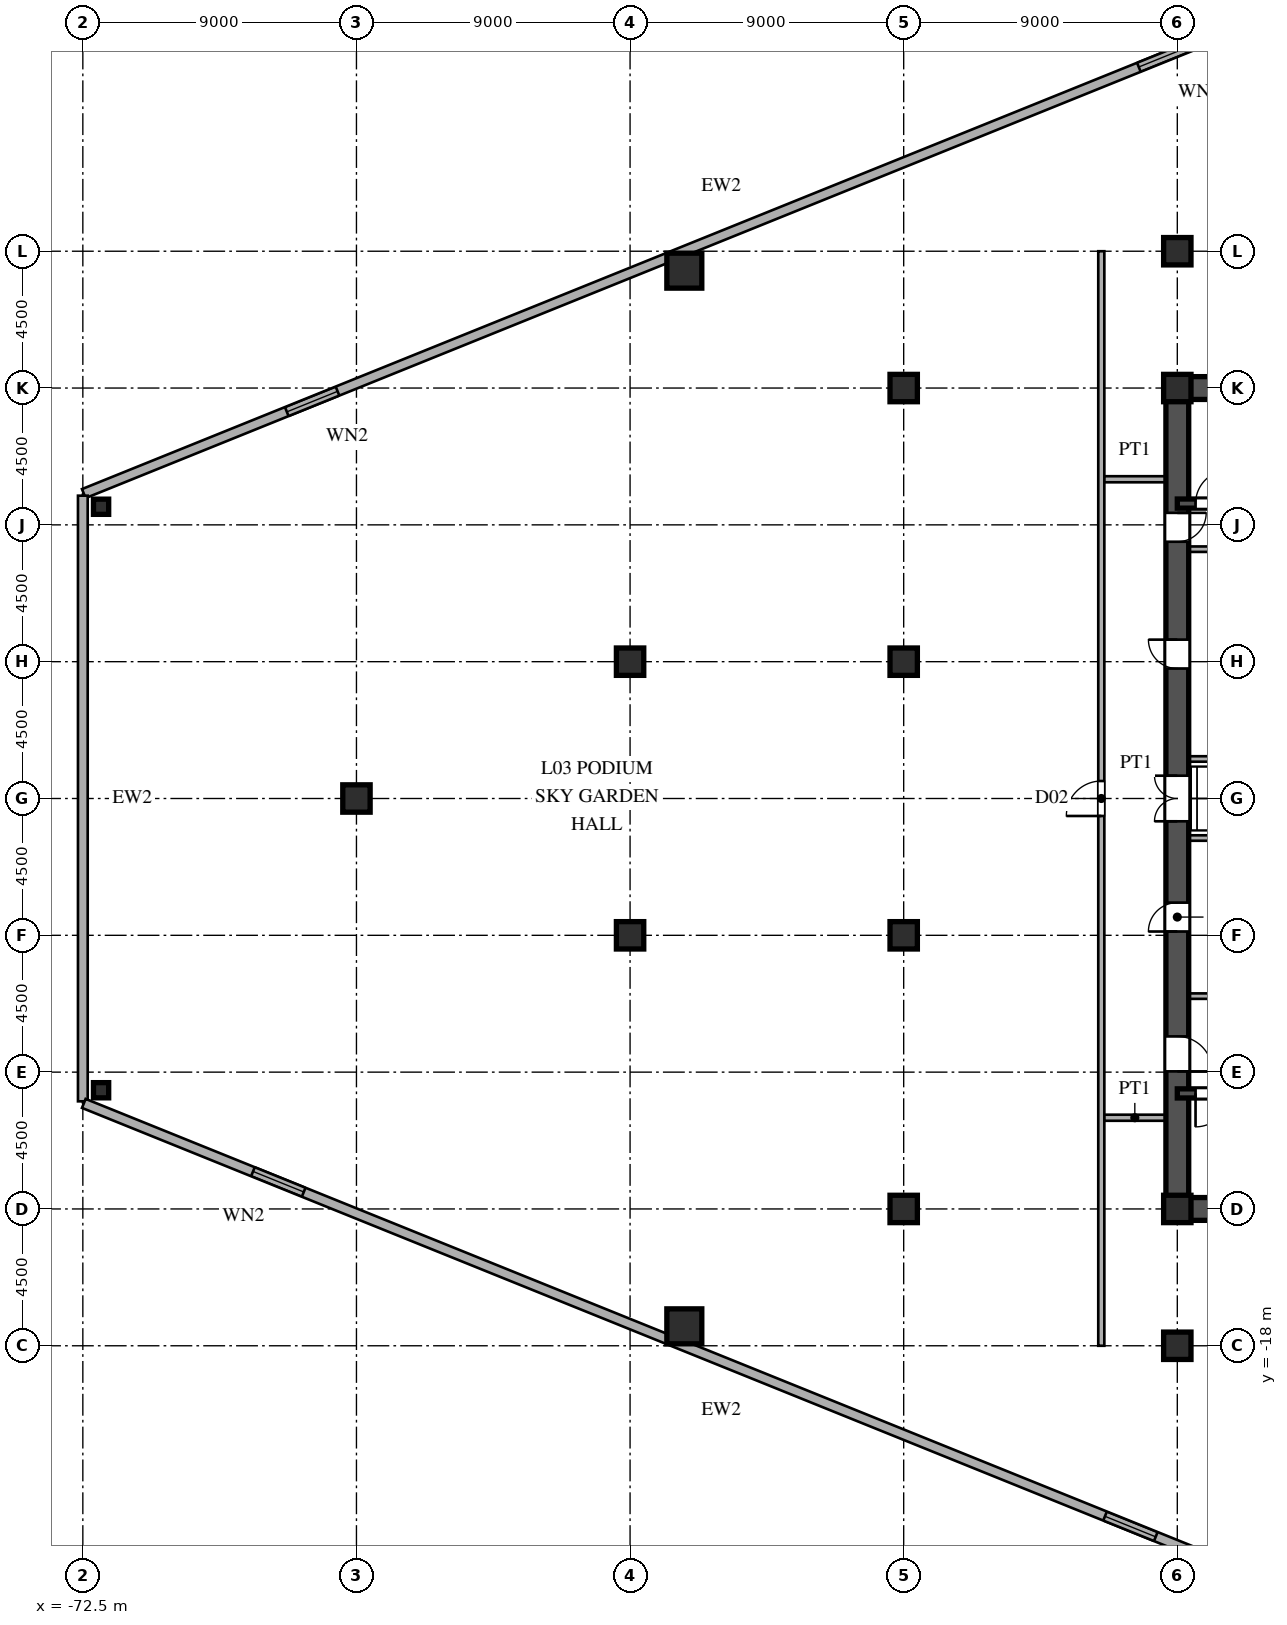
"""IFC4 building model, lengths in metres.
Left out: names, types, materials, properties, quantities, classifications, styles, units other than length and angle.
Written with IfcOpenShell. Run it as: python <this file> out.ifc"""

import sys

from ifc_helpers import new_model, si_unit, direction, frame, frame_2d, origin, origin_2d, place, context, subcontext, project, spatial, rectangle, hollow_rectangle, i_section, extrude, source, transform, mapped, element, fill, save


model = new_model("IFC4")
c1 = context("Model", 3, precision=1e-05, world=origin(), true_north=direction((0.0, 1.0)))
c2 = subcontext(c1, "Body", "Model", "MODEL_VIEW")
j1 = project(units=[si_unit("LENGTHUNIT", "METRE"), si_unit("PLANEANGLEUNIT", "RADIAN")], contexts=[c1])
p1 = place(None, origin())
s1 = spatial("IfcSite", under=j1, at=p1, CompositionType="ELEMENT")
p2 = place(p1, origin())
s2 = spatial("IfcBuilding", under=s1, at=p2, CompositionType="ELEMENT")
p3 = place(p2, frame((0.0, 0.0, 14.4)))
s3 = spatial("IfcBuildingStorey", under=s2, at=p3, CompositionType="ELEMENT", Elevation=14.4)
m1 = source(origin(), c2, "Body", "SweptSolid", [
    extrude(i_section(OverallWidth=0.9, OverallDepth=0.9, WebThickness=0.036, FlangeThickness=0.055, at=origin_2d()), origin(), (0.0, 0.0, 1.0), 4.5),
])
for number, where, z_axis, x_axis in (
    (1, (-36.5, -18.0, 0.0), (0.0, 0.0, 1.0), (1.0, 0.0, 0.0)),
    (2, (-36.5, -13.5, 0.0), (0.0, 0.0, 1.0), (1.0, 0.0, 0.0)),
    (3, (-36.5, 13.5, 0.0), (0.0, 0.0, 1.0), (1.0, 0.0, 0.0)),
    (4, (-36.5, 18.0, 0.0), (0.0, 0.0, 1.0), (1.0, 0.0, 0.0)),
    (5, (-45.5, -13.5, 0.0), (0.0, 0.0, 1.0), (1.0, 0.0, 0.0)),
    (6, (-45.5, -4.5, 0.0), (0.0, 0.0, 1.0), (1.0, 0.0, 0.0)),
    (7, (-45.5, 4.5, 0.0), (0.0, 0.0, 1.0), (1.0, 0.0, 0.0)),
    (8, (-45.5, 13.5, 0.0), (0.0, 0.0, 1.0), (1.0, 0.0, 0.0)),
    (9, (-54.5, -4.5, 0.0), (0.0, 0.0, 1.0), (1.0, 0.0, 0.0)),
    (10, (-54.5, 4.5, 0.0), (0.0, 0.0, 1.0), (1.0, 0.0, 0.0)),
    (11, (-63.5, 0.0, 0.0), (0.0, 0.0, 1.0), (1.0, 0.0, 0.0)),
):
    element("IfcColumn", number, at=place(p3, frame(where, z_axis=z_axis, x_axis=x_axis)), inside=s3, PredefinedType="COLUMN", context=c2, shape_type="MappedRepresentation", body=[
        mapped(m1, transform((0.0, 0.0, 0.0), scale=1.0)),
    ])
m2 = source(origin(), c2, "Body", "SweptSolid", [
    extrude(hollow_rectangle(XDim=0.5, YDim=0.5, WallThickness=0.02, at=origin_2d()), origin(), (0.0, 0.0, 1.0), 4.5),
])
for number, where, z_axis, x_axis in (
    (12, (-71.9, 9.596, 0.0), (0.0, 0.0, 1.0), (1.0, 0.0, 0.0)),
    (13, (-71.9, -9.596, 0.0), (0.0, 0.0, 1.0), (1.0, 0.0, 0.0)),
):
    element("IfcColumn", number, at=place(p3, frame(where, z_axis=z_axis, x_axis=x_axis)), inside=s3, PredefinedType="COLUMN", context=c2, shape_type="MappedRepresentation", body=[
        mapped(m2, transform((0.0, 0.0, 0.0), scale=1.0)),
    ])
m3 = source(origin(), c2, "Body", "SweptSolid", [
    extrude(hollow_rectangle(XDim=1.15, YDim=1.15, WallThickness=0.048, at=origin_2d()), origin(), (0.0, 0.0, 1.0), 4.5),
])
for number, where, z_axis, x_axis in (
    (14, (-52.716, -17.361, 0.0), (0.0, 0.0, 1.0), (1.0, 0.0, 0.0)),
    (15, (-52.716, 17.361, 0.0), (0.0, 0.0, 1.0), (1.0, 0.0, 0.0)),
):
    element("IfcColumn", number, at=place(p3, frame(where, z_axis=z_axis, x_axis=x_axis)), inside=s3, PredefinedType="COLUMN", context=c2, shape_type="MappedRepresentation", body=[
        mapped(m3, transform((0.0, 0.0, 0.0), scale=1.0)),
    ])
p4 = place(p3, frame((-72.463, -10.015, 0.0), z_axis=(0.0, 0.0, 1.0), x_axis=(0.926944846568, -0.375197616492, 0.0)))
e16 = element("IfcWall", 16, at=p4, inside=s3, PredefinedType="SOLIDWALL", context=c2, shape_type="SweptSolid", body=[
    extrude(rectangle(XDim=45.23, YDim=0.32, at=frame_2d((22.615, 0.0))), origin(), (0.0, 0.0, 1.0), 4.28),
])
p5 = place(p4, frame((6.0, 0.0, 0.85)))
e17 = element("IfcOpeningElement", 17, at=p5, cuts=e16, PredefinedType="OPENING", context=c2, shape_type="SweptSolid", body=[
    extrude(rectangle(XDim=1.8, YDim=2.0, at=frame_2d((0.9, 1.0))), frame((0.0, 0.17, 0.0), z_axis=(0.0, -1.0, 0.0), x_axis=(1.0, 0.0, 0.0)), (0.0, 0.0, 1.0), 0.34),
])
p6 = place(p4, frame((36.23, 0.0, 0.85)))
e18 = element("IfcOpeningElement", 18, at=p6, cuts=e16, PredefinedType="OPENING", context=c2, shape_type="SweptSolid", body=[
    extrude(rectangle(XDim=1.8, YDim=2.0, at=frame_2d((0.9, 1.0))), frame((0.0, 0.17, 0.0), z_axis=(0.0, -1.0, 0.0), x_axis=(1.0, 0.0, 0.0)), (0.0, 0.0, 1.0), 0.34),
])
p7 = place(p3, frame((-30.537, 26.985, 0.0), z_axis=(0.0, 0.0, 1.0), x_axis=(-0.926944846568, -0.375197616492, 0.0)))
e19 = element("IfcWall", 19, at=p7, inside=s3, PredefinedType="SOLIDWALL", context=c2, shape_type="SweptSolid", body=[
    extrude(rectangle(XDim=45.23, YDim=0.32, at=frame_2d((22.615, 0.0))), origin(), (0.0, 0.0, 1.0), 4.28),
])
p8 = place(p7, frame((6.0, 0.0, 0.85)))
e20 = element("IfcOpeningElement", 20, at=p8, cuts=e19, PredefinedType="OPENING", context=c2, shape_type="SweptSolid", body=[
    extrude(rectangle(XDim=1.8, YDim=2.0, at=frame_2d((0.9, 1.0))), frame((0.0, 0.17, 0.0), z_axis=(0.0, -1.0, 0.0), x_axis=(1.0, 0.0, 0.0)), (0.0, 0.0, 1.0), 0.34),
])
p9 = place(p7, frame((36.23, 0.0, 0.85)))
e21 = element("IfcOpeningElement", 21, at=p9, cuts=e19, PredefinedType="OPENING", context=c2, shape_type="SweptSolid", body=[
    extrude(rectangle(XDim=1.8, YDim=2.0, at=frame_2d((0.9, 1.0))), frame((0.0, 0.17, 0.0), z_axis=(0.0, -1.0, 0.0), x_axis=(1.0, 0.0, 0.0)), (0.0, 0.0, 1.0), 0.34),
])
p10 = place(p3, frame((-72.5, 9.96, 0.0), z_axis=(0.0, 0.0, 1.0), x_axis=(0.0, -1.0, 0.0)))
e22 = element("IfcWall", 22, at=p10, inside=s3, PredefinedType="SOLIDWALL", context=c2, shape_type="SweptSolid", body=[
    extrude(rectangle(XDim=19.92, YDim=0.32, at=frame_2d((9.96, 0.0))), origin(), (0.0, 0.0, 1.0), 4.28),
])
for number, where, z_axis, x_axis in (
    (23, (-36.5, -13.5, 0.0), (0.0, 0.0, 1.0), (1.0, 0.0, 0.0)),
    (24, (-36.5, 13.5, 0.0), (0.0, 0.0, 1.0), (1.0, 0.0, 0.0)),
):
    element("IfcWall", number, at=place(p3, frame(where, z_axis=z_axis, x_axis=x_axis)), inside=s3, PredefinedType="SHEAR", context=c2, shape_type="SweptSolid", body=[
        extrude(rectangle(XDim=9.0, YDim=0.75, at=frame_2d((4.5, 0.0))), origin(), (0.0, 0.0, 1.0), 4.28),
    ])
p11 = place(p3, frame((-36.5, -13.65, 0.0), z_axis=(0.0, 0.0, 1.0), x_axis=(0.0, 1.0, 0.0)))
e25 = element("IfcWall", 25, at=p11, inside=s3, PredefinedType="SHEAR", context=c2, shape_type="SweptSolid", body=[
    extrude(rectangle(XDim=7.15, YDim=0.75, at=frame_2d((3.575, 0.0))), origin(), (0.0, 0.0, 1.0), 4.28),
])
p12 = place(p11, frame((4.675, 0.0, 0.0)))
e26 = element("IfcOpeningElement", 26, at=p12, cuts=e25, PredefinedType="OPENING", context=c2, shape_type="SweptSolid", body=[
    extrude(rectangle(XDim=1.15, YDim=2.2, at=frame_2d((0.575, 1.1))), frame((0.0, 0.385, 0.0), z_axis=(0.0, -1.0, 0.0), x_axis=(1.0, 0.0, 0.0)), (0.0, 0.0, 1.0), 0.77),
])
p13 = place(p3, frame((-36.5, -1.3, 0.0), z_axis=(0.0, 0.0, 1.0), x_axis=(0.0, 1.0, 0.0)))
e27 = element("IfcWall", 27, at=p13, inside=s3, PredefinedType="SHEAR", context=c2, shape_type="SweptSolid", body=[
    extrude(rectangle(XDim=2.6, YDim=0.75, at=frame_2d((1.3, 0.0))), origin(), (0.0, 0.0, 1.0), 4.28),
])
p14 = place(p13, frame((0.55, 0.0, 0.0)))
e28 = element("IfcOpeningElement", 28, at=p14, cuts=e27, PredefinedType="OPENING", context=c2, shape_type="SweptSolid", body=[
    extrude(rectangle(XDim=1.5, YDim=2.3, at=frame_2d((0.75, 1.15))), frame((0.0, 0.385, 0.0), z_axis=(0.0, -1.0, 0.0), x_axis=(1.0, 0.0, 0.0)), (0.0, 0.0, 1.0), 0.77),
])
p15 = place(p3, frame((-36.5, 8.2, 0.0), z_axis=(0.0, 0.0, 1.0), x_axis=(0.0, 1.0, 0.0)))
e29 = element("IfcWall", 29, at=p15, inside=s3, PredefinedType="SHEAR", context=c2, shape_type="SweptSolid", body=[
    extrude(rectangle(XDim=5.45, YDim=0.75, at=frame_2d((2.725, 0.0))), origin(), (0.0, 0.0, 1.0), 4.28),
])
p16 = place(p15, frame((0.245, 0.0, 0.0)))
e30 = element("IfcOpeningElement", 30, at=p16, cuts=e29, PredefinedType="OPENING", context=c2, shape_type="SweptSolid", body=[
    extrude(rectangle(XDim=0.95, YDim=2.15, at=frame_2d((0.475, 1.075))), frame((0.0, 0.385, 0.0), z_axis=(0.0, -1.0, 0.0), x_axis=(1.0, 0.0, 0.0)), (0.0, 0.0, 1.0), 0.77),
])
p17 = place(p3, frame((-36.5, -6.5, 0.0), z_axis=(0.0, 0.0, 1.0), x_axis=(0.0, 1.0, 0.0)))
e31 = element("IfcWall", 31, at=p17, inside=s3, PredefinedType="SHEAR", context=c2, shape_type="SweptSolid", body=[
    extrude(rectangle(XDim=5.2, YDim=0.75, at=frame_2d((2.6, 0.0))), origin(), (0.0, 0.0, 1.0), 4.28),
])
p18 = place(p17, frame((2.125, 0.0, 0.0)))
e32 = element("IfcOpeningElement", 32, at=p18, cuts=e31, PredefinedType="OPENING", context=c2, shape_type="SweptSolid", body=[
    extrude(rectangle(XDim=0.95, YDim=2.15, at=frame_2d((0.475, 1.075))), frame((0.0, 0.385, 0.0), z_axis=(0.0, -1.0, 0.0), x_axis=(1.0, 0.0, 0.0)), (0.0, 0.0, 1.0), 0.77),
])
p19 = place(p3, frame((-36.5, 1.3, 0.0), z_axis=(0.0, 0.0, 1.0), x_axis=(0.0, 1.0, 0.0)))
e33 = element("IfcWall", 33, at=p19, inside=s3, PredefinedType="SHEAR", context=c2, shape_type="SweptSolid", body=[
    extrude(rectangle(XDim=6.9, YDim=0.75, at=frame_2d((3.45, 0.0))), origin(), (0.0, 0.0, 1.0), 4.28),
])
p20 = place(p19, frame((2.975, 0.0, 0.0)))
e34 = element("IfcOpeningElement", 34, at=p20, cuts=e33, PredefinedType="OPENING", context=c2, shape_type="SweptSolid", body=[
    extrude(rectangle(XDim=0.95, YDim=2.15, at=frame_2d((0.475, 1.075))), frame((0.0, 0.385, 0.0), z_axis=(0.0, -1.0, 0.0), x_axis=(1.0, 0.0, 0.0)), (0.0, 0.0, 1.0), 0.77),
])
p21 = place(p3, frame((-36.5, -9.7, 0.0), z_axis=(0.0, 0.0, 1.0), x_axis=(1.0, 0.0, 0.0)))
e35 = element("IfcWall", 35, at=p21, inside=s3, PredefinedType="SHEAR", context=c2, shape_type="SweptSolid", body=[
    extrude(rectangle(XDim=9.0, YDim=0.3, at=frame_2d((4.5, 0.0))), origin(), (0.0, 0.0, 1.0), 4.28),
])
p22 = place(p21, frame((0.6, 0.0, 0.0)))
e36 = element("IfcOpeningElement", 36, at=p22, cuts=e35, PredefinedType="OPENING", context=c2, shape_type="SweptSolid", body=[
    extrude(rectangle(XDim=1.1, YDim=2.2, at=frame_2d((0.55, 1.1))), frame((0.0, 0.16, 0.0), z_axis=(0.0, -1.0, 0.0), x_axis=(1.0, 0.0, 0.0)), (0.0, 0.0, 1.0), 0.32),
])
p23 = place(p3, frame((-36.5, 9.7, 0.0), z_axis=(0.0, 0.0, 1.0), x_axis=(1.0, 0.0, 0.0)))
e37 = element("IfcWall", 37, at=p23, inside=s3, PredefinedType="SHEAR", context=c2, shape_type="SweptSolid", body=[
    extrude(rectangle(XDim=9.0, YDim=0.3, at=frame_2d((4.5, 0.0))), origin(), (0.0, 0.0, 1.0), 4.28),
])
p24 = place(p23, frame((0.6, 0.0, 0.0)))
e38 = element("IfcOpeningElement", 38, at=p24, cuts=e37, PredefinedType="OPENING", context=c2, shape_type="SweptSolid", body=[
    extrude(rectangle(XDim=1.1, YDim=2.2, at=frame_2d((0.55, 1.1))), frame((0.0, 0.16, 0.0), z_axis=(0.0, -1.0, 0.0), x_axis=(1.0, 0.0, 0.0)), (0.0, 0.0, 1.0), 0.32),
])
for number, where, z_axis, x_axis in (
    (39, (-36.15, -6.5, 0.0), (0.0, 0.0, 1.0), (1.0, 0.0, 0.0)),
    (40, (-36.15, 8.2, 0.0), (0.0, 0.0, 1.0), (1.0, 0.0, 0.0)),
):
    element("IfcWall", number, at=place(p3, frame(where, z_axis=z_axis, x_axis=x_axis)), inside=s3, PredefinedType="PARTITIONING", context=c2, shape_type="SweptSolid", body=[
        extrude(rectangle(XDim=5.7, YDim=0.18, at=frame_2d((2.85, 0.0))), origin(), (0.0, 0.0, 1.0), 4.28),
    ])
for number, where, z_axis, x_axis in (
    (41, (-36.15, -1.3, 0.0), (0.0, 0.0, 1.0), (1.0, 0.0, 0.0)),
    (42, (-36.15, 1.3, 0.0), (0.0, 0.0, 1.0), (1.0, 0.0, 0.0)),
):
    element("IfcWall", number, at=place(p3, frame(where, z_axis=z_axis, x_axis=x_axis)), inside=s3, PredefinedType="PARTITIONING", context=c2, shape_type="SweptSolid", body=[
        extrude(rectangle(XDim=2.95, YDim=0.18, at=frame_2d((1.475, 0.0))), origin(), (0.0, 0.0, 1.0), 4.28),
    ])
for number, where, z_axis, x_axis in (
    (43, (-38.915, -10.5, 0.0), (0.0, 0.0, 1.0), (1.0, 0.0, 0.0)),
    (44, (-38.915, 10.5, 0.0), (0.0, 0.0, 1.0), (1.0, 0.0, 0.0)),
):
    element("IfcWall", number, at=place(p3, frame(where, z_axis=z_axis, x_axis=x_axis)), inside=s3, PredefinedType="PARTITIONING", context=c2, shape_type="SweptSolid", body=[
        extrude(rectangle(XDim=2.035, YDim=0.2, at=frame_2d((1.018, 0.0))), origin(), (0.0, 0.0, 1.0), 4.28),
    ])
p25 = place(p3, frame((-39.0, -18.0, 0.0), z_axis=(0.0, 0.0, 1.0), x_axis=(0.0, 1.0, 0.0)))
e45 = element("IfcWall", 45, at=p25, inside=s3, PredefinedType="PARTITIONING", context=c2, shape_type="SweptSolid", body=[
    extrude(rectangle(XDim=36.0, YDim=0.2, at=frame_2d((18.0, 0.0))), origin(), (0.0, 0.0, 1.0), 4.28),
])
p26 = place(p25, frame((17.425, 0.0, 0.0)))
e46 = element("IfcOpeningElement", 46, at=p26, cuts=e45, PredefinedType="OPENING", context=c2, shape_type="SweptSolid", body=[
    extrude(rectangle(XDim=1.15, YDim=2.2, at=frame_2d((0.575, 1.1))), frame((0.0, 0.11, 0.0), z_axis=(0.0, -1.0, 0.0), x_axis=(1.0, 0.0, 0.0)), (0.0, 0.0, 1.0), 0.22),
])
m4 = source(origin(), c2, "Body", "SweptSolid", [
    extrude(rectangle(XDim=1.8, YDim=2.0, at=frame_2d((0.9, 1.0))), frame((0.0, 0.03, 0.0), z_axis=(0.0, -1.0, 0.0), x_axis=(1.0, 0.0, 0.0)), (0.0, 0.0, 1.0), 0.06),
])
p27 = place(p5, origin())
e47 = element("IfcWindow", 47, at=p27, inside=s3, PartitioningType="SINGLE_PANEL", PredefinedType="WINDOW", context=c2, shape_type="MappedRepresentation", body=[
    mapped(m4, transform((0.0, 0.0, 0.0), scale=1.0)),
])
fill(e17, e47)
p28 = place(p6, origin())
e48 = element("IfcWindow", 48, at=p28, inside=s3, PartitioningType="SINGLE_PANEL", PredefinedType="WINDOW", context=c2, shape_type="MappedRepresentation", body=[
    mapped(m4, transform((0.0, 0.0, 0.0), scale=1.0)),
])
fill(e18, e48)
p29 = place(p8, origin())
e49 = element("IfcWindow", 49, at=p29, inside=s3, PartitioningType="SINGLE_PANEL", PredefinedType="WINDOW", context=c2, shape_type="MappedRepresentation", body=[
    mapped(m4, transform((0.0, 0.0, 0.0), scale=1.0)),
])
fill(e20, e49)
p30 = place(p9, origin())
e50 = element("IfcWindow", 50, at=p30, inside=s3, PartitioningType="SINGLE_PANEL", PredefinedType="WINDOW", context=c2, shape_type="MappedRepresentation", body=[
    mapped(m4, transform((0.0, 0.0, 0.0), scale=1.0)),
])
fill(e21, e50)
m5 = source(origin(), c2, "Body", "SweptSolid", [
    extrude(rectangle(XDim=1.15, YDim=2.2, at=frame_2d((0.575, 1.1))), frame((0.0, 0.025, 0.0), z_axis=(0.0, -1.0, 0.0), x_axis=(1.0, 0.0, 0.0)), (0.0, 0.0, 1.0), 0.05),
])
p31 = place(p12, frame((1.15, 0.0, 0.0), z_axis=(0.0, 0.0, 1.0), x_axis=(-1.0, 0.0, 0.0)))
e51 = element("IfcDoor", 51, at=p31, inside=s3, OperationType="SINGLE_SWING_LEFT", PredefinedType="DOOR", context=c2, shape_type="MappedRepresentation", body=[
    mapped(m5, transform((0.0, 0.0, 0.0), scale=1.0)),
])
fill(e26, e51)
m6 = source(origin(), c2, "Body", "SweptSolid", [
    extrude(rectangle(XDim=1.5, YDim=2.3, at=frame_2d((0.75, 1.15))), frame((0.0, 0.025, 0.0), z_axis=(0.0, -1.0, 0.0), x_axis=(1.0, 0.0, 0.0)), (0.0, 0.0, 1.0), 0.05),
])
p32 = place(p14, origin())
e52 = element("IfcDoor", 52, at=p32, inside=s3, OperationType="DOUBLE_SWING_LEFT", PredefinedType="DOOR", context=c2, shape_type="MappedRepresentation", body=[
    mapped(m6, transform((0.0, 0.0, 0.0), scale=1.0)),
])
fill(e28, e52)
m7 = source(origin(), c2, "Body", "SweptSolid", [
    extrude(rectangle(XDim=0.95, YDim=2.15, at=frame_2d((0.475, 1.075))), frame((0.0, 0.025, 0.0), z_axis=(0.0, -1.0, 0.0), x_axis=(1.0, 0.0, 0.0)), (0.0, 0.0, 1.0), 0.05),
])
p33 = place(p16, frame((0.95, 0.0, 0.0), z_axis=(0.0, 0.0, 1.0), x_axis=(-1.0, 0.0, 0.0)))
e53 = element("IfcDoor", 53, at=p33, inside=s3, OperationType="SINGLE_SWING_RIGHT", PredefinedType="DOOR", context=c2, shape_type="MappedRepresentation", body=[
    mapped(m7, transform((0.0, 0.0, 0.0), scale=1.0)),
])
fill(e30, e53)
p34 = place(p18, origin())
e54 = element("IfcDoor", 54, at=p34, inside=s3, OperationType="SINGLE_SWING_LEFT", PredefinedType="DOOR", context=c2, shape_type="MappedRepresentation", body=[
    mapped(m7, transform((0.0, 0.0, 0.0), scale=1.0)),
])
fill(e32, e54)
p35 = place(p20, origin())
e55 = element("IfcDoor", 55, at=p35, inside=s3, OperationType="SINGLE_SWING_RIGHT", PredefinedType="DOOR", context=c2, shape_type="MappedRepresentation", body=[
    mapped(m7, transform((0.0, 0.0, 0.0), scale=1.0)),
])
fill(e34, e55)
m8 = source(origin(), c2, "Body", "SweptSolid", [
    extrude(rectangle(XDim=1.1, YDim=2.2, at=frame_2d((0.55, 1.1))), frame((0.0, 0.025, 0.0), z_axis=(0.0, -1.0, 0.0), x_axis=(1.0, 0.0, 0.0)), (0.0, 0.0, 1.0), 0.05),
])
p36 = place(p22, frame((1.1, 0.0, 0.0), z_axis=(0.0, 0.0, 1.0), x_axis=(-1.0, 0.0, 0.0)))
e56 = element("IfcDoor", 56, at=p36, inside=s3, OperationType="SINGLE_SWING_LEFT", PredefinedType="DOOR", context=c2, shape_type="MappedRepresentation", body=[
    mapped(m8, transform((0.0, 0.0, 0.0), scale=1.0)),
])
fill(e36, e56)
p37 = place(p24, origin())
e57 = element("IfcDoor", 57, at=p37, inside=s3, OperationType="SINGLE_SWING_RIGHT", PredefinedType="DOOR", context=c2, shape_type="MappedRepresentation", body=[
    mapped(m8, transform((0.0, 0.0, 0.0), scale=1.0)),
])
fill(e38, e57)
p38 = place(p26, origin())
e58 = element("IfcDoor", 58, at=p38, inside=s3, OperationType="SINGLE_SWING_LEFT", PredefinedType="DOOR", context=c2, shape_type="MappedRepresentation", body=[
    mapped(m5, transform((0.0, 0.0, 0.0), scale=1.0)),
])
fill(e46, e58)
save(model, sys.argv[1])
